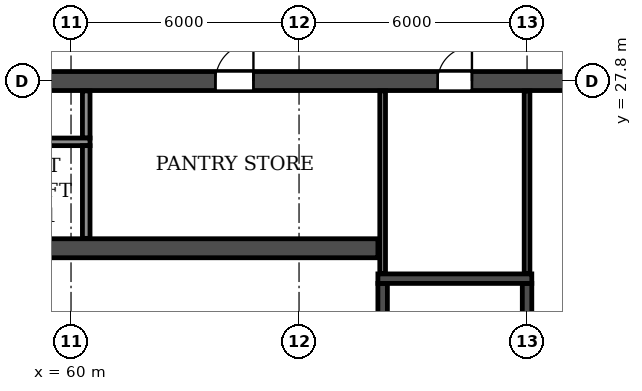
"""IFC4 building model, lengths in metres.
Left out: names, types, materials, properties, quantities, classifications, styles, units other than length and angle.
Written with IfcOpenShell. Run it as: python <this file> out.ifc"""

import sys

from ifc_helpers import new_model, si_unit, direction, frame, frame_2d, origin, place, context, subcontext, project, spatial, rectangle, extrude, element, fill, save


model = new_model("IFC4")
c1 = context("Model", 3, precision=1e-05, world=origin(), true_north=direction((0.0, 1.0)))
c2 = subcontext(c1, "Body", "Model", "MODEL_VIEW")
j1 = project(units=[si_unit("LENGTHUNIT", "METRE"), si_unit("PLANEANGLEUNIT", "RADIAN")], contexts=[c1])
p1 = place(None, origin())
s1 = spatial("IfcSite", under=j1, at=p1, CompositionType="ELEMENT")
p2 = place(p1, origin())
s2 = spatial("IfcBuilding", under=s1, at=p2, CompositionType="ELEMENT")
p3 = place(p2, frame((0.0, 0.0, 72.9)))
s3 = spatial("IfcBuildingStorey", under=s2, at=p3, CompositionType="ELEMENT", Elevation=72.9)
p4 = place(p3, frame((8.6, 27.8, 0.0), z_axis=(0.0, 0.0, 1.0), x_axis=(1.0, 0.0, 0.0)))
e1 = element("IfcWall", 1, at=p4, inside=s3, PredefinedType="SOLIDWALL", context=c2, shape_type="SweptSolid", body=[
    extrude(rectangle(XDim=84.8, YDim=0.5, at=frame_2d((42.4, 0.0))), origin(), (0.0, 0.0, 1.0), 3.06),
])
p5 = place(p4, frame((2.0, 0.0, 0.0)))
e2 = element("IfcOpeningElement", 2, at=p5, cuts=e1, PredefinedType="OPENING", context=c2, shape_type="SweptSolid", body=[
    extrude(rectangle(XDim=1.5, YDim=2.1, at=frame_2d((0.75, 1.05))), frame((0.0, 0.26, 0.0), z_axis=(0.0, -1.0, 0.0), x_axis=(1.0, 0.0, 0.0)), (0.0, 0.0, 1.0), 0.52),
])
p6 = place(p4, frame((6.95, 0.0, 0.0)))
e3 = element("IfcOpeningElement", 3, at=p6, cuts=e1, PredefinedType="OPENING", context=c2, shape_type="SweptSolid", body=[
    extrude(rectangle(XDim=1.0, YDim=2.1, at=frame_2d((0.5, 1.05))), frame((0.0, 0.26, 0.0), z_axis=(0.0, -1.0, 0.0), x_axis=(1.0, 0.0, 0.0)), (0.0, 0.0, 1.0), 0.52),
])
p7 = place(p4, frame((10.3, 0.0, 0.0)))
e4 = element("IfcOpeningElement", 4, at=p7, cuts=e1, PredefinedType="OPENING", context=c2, shape_type="SweptSolid", body=[
    extrude(rectangle(XDim=1.0, YDim=2.1, at=frame_2d((0.5, 1.05))), frame((0.0, 0.26, 0.0), z_axis=(0.0, -1.0, 0.0), x_axis=(1.0, 0.0, 0.0)), (0.0, 0.0, 1.0), 0.52),
])
p8 = place(p4, frame((13.65, 0.0, 0.0)))
e5 = element("IfcOpeningElement", 5, at=p8, cuts=e1, PredefinedType="OPENING", context=c2, shape_type="SweptSolid", body=[
    extrude(rectangle(XDim=0.9, YDim=2.1, at=frame_2d((0.45, 1.05))), frame((0.0, 0.26, 0.0), z_axis=(0.0, -1.0, 0.0), x_axis=(1.0, 0.0, 0.0)), (0.0, 0.0, 1.0), 0.52),
])
p9 = place(p4, frame((22.85, 0.0, 0.0)))
e6 = element("IfcOpeningElement", 6, at=p9, cuts=e1, PredefinedType="OPENING", context=c2, shape_type="SweptSolid", body=[
    extrude(rectangle(XDim=0.9, YDim=2.1, at=frame_2d((0.45, 1.05))), frame((0.0, 0.26, 0.0), z_axis=(0.0, -1.0, 0.0), x_axis=(1.0, 0.0, 0.0)), (0.0, 0.0, 1.0), 0.52),
])
p10 = place(p4, frame((26.0, 0.0, 0.0)))
e7 = element("IfcOpeningElement", 7, at=p10, cuts=e1, PredefinedType="OPENING", context=c2, shape_type="SweptSolid", body=[
    extrude(rectangle(XDim=1.0, YDim=2.1, at=frame_2d((0.5, 1.05))), frame((0.0, 0.26, 0.0), z_axis=(0.0, -1.0, 0.0), x_axis=(1.0, 0.0, 0.0)), (0.0, 0.0, 1.0), 0.52),
])
p11 = place(p4, frame((31.2, 0.0, 0.0)))
e8 = element("IfcOpeningElement", 8, at=p11, cuts=e1, PredefinedType="OPENING", context=c2, shape_type="SweptSolid", body=[
    extrude(rectangle(XDim=1.0, YDim=2.1, at=frame_2d((0.5, 1.05))), frame((0.0, 0.26, 0.0), z_axis=(0.0, -1.0, 0.0), x_axis=(1.0, 0.0, 0.0)), (0.0, 0.0, 1.0), 0.52),
])
p12 = place(p4, frame((39.0, 0.0, 0.0)))
e9 = element("IfcOpeningElement", 9, at=p12, cuts=e1, PredefinedType="OPENING", context=c2, shape_type="SweptSolid", body=[
    extrude(rectangle(XDim=1.0, YDim=2.1, at=frame_2d((0.5, 1.05))), frame((0.0, 0.26, 0.0), z_axis=(0.0, -1.0, 0.0), x_axis=(1.0, 0.0, 0.0)), (0.0, 0.0, 1.0), 0.52),
])
p13 = place(p4, frame((41.9, 0.0, 0.0)))
e10 = element("IfcOpeningElement", 10, at=p13, cuts=e1, PredefinedType="OPENING", context=c2, shape_type="SweptSolid", body=[
    extrude(rectangle(XDim=1.0, YDim=2.1, at=frame_2d((0.5, 1.05))), frame((0.0, 0.26, 0.0), z_axis=(0.0, -1.0, 0.0), x_axis=(1.0, 0.0, 0.0)), (0.0, 0.0, 1.0), 0.52),
])
p14 = place(p4, frame((44.8, 0.0, 0.0)))
e11 = element("IfcOpeningElement", 11, at=p14, cuts=e1, PredefinedType="OPENING", context=c2, shape_type="SweptSolid", body=[
    extrude(rectangle(XDim=1.0, YDim=2.1, at=frame_2d((0.5, 1.05))), frame((0.0, 0.26, 0.0), z_axis=(0.0, -1.0, 0.0), x_axis=(1.0, 0.0, 0.0)), (0.0, 0.0, 1.0), 0.52),
])
p15 = place(p4, frame((48.7, 0.0, 0.0)))
e12 = element("IfcOpeningElement", 12, at=p15, cuts=e1, PredefinedType="OPENING", context=c2, shape_type="SweptSolid", body=[
    extrude(rectangle(XDim=1.0, YDim=2.1, at=frame_2d((0.5, 1.05))), frame((0.0, 0.26, 0.0), z_axis=(0.0, -1.0, 0.0), x_axis=(1.0, 0.0, 0.0)), (0.0, 0.0, 1.0), 0.52),
])
p16 = place(p4, frame((55.2, 0.0, 0.0)))
e13 = element("IfcOpeningElement", 13, at=p16, cuts=e1, PredefinedType="OPENING", context=c2, shape_type="SweptSolid", body=[
    extrude(rectangle(XDim=1.0, YDim=2.1, at=frame_2d((0.5, 1.05))), frame((0.0, 0.26, 0.0), z_axis=(0.0, -1.0, 0.0), x_axis=(1.0, 0.0, 0.0)), (0.0, 0.0, 1.0), 0.52),
])
p17 = place(p4, frame((61.05, 0.0, 0.0)))
e14 = element("IfcOpeningElement", 14, at=p17, cuts=e1, PredefinedType="OPENING", context=c2, shape_type="SweptSolid", body=[
    extrude(rectangle(XDim=0.9, YDim=2.1, at=frame_2d((0.45, 1.05))), frame((0.0, 0.26, 0.0), z_axis=(0.0, -1.0, 0.0), x_axis=(1.0, 0.0, 0.0)), (0.0, 0.0, 1.0), 0.52),
])
p18 = place(p4, frame((70.25, 0.0, 0.0)))
e15 = element("IfcOpeningElement", 15, at=p18, cuts=e1, PredefinedType="OPENING", context=c2, shape_type="SweptSolid", body=[
    extrude(rectangle(XDim=0.9, YDim=2.1, at=frame_2d((0.45, 1.05))), frame((0.0, 0.26, 0.0), z_axis=(0.0, -1.0, 0.0), x_axis=(1.0, 0.0, 0.0)), (0.0, 0.0, 1.0), 0.52),
])
p19 = place(p4, frame((73.5, 0.0, 0.0)))
e16 = element("IfcOpeningElement", 16, at=p19, cuts=e1, PredefinedType="OPENING", context=c2, shape_type="SweptSolid", body=[
    extrude(rectangle(XDim=1.0, YDim=2.1, at=frame_2d((0.5, 1.05))), frame((0.0, 0.26, 0.0), z_axis=(0.0, -1.0, 0.0), x_axis=(1.0, 0.0, 0.0)), (0.0, 0.0, 1.0), 0.52),
])
p20 = place(p4, frame((76.25, 0.0, 0.0)))
e17 = element("IfcOpeningElement", 17, at=p20, cuts=e1, PredefinedType="OPENING", context=c2, shape_type="SweptSolid", body=[
    extrude(rectangle(XDim=1.0, YDim=2.1, at=frame_2d((0.5, 1.05))), frame((0.0, 0.26, 0.0), z_axis=(0.0, -1.0, 0.0), x_axis=(1.0, 0.0, 0.0)), (0.0, 0.0, 1.0), 0.52),
])
p21 = place(p4, frame((80.95, 0.0, 0.0)))
e18 = element("IfcOpeningElement", 18, at=p21, cuts=e1, PredefinedType="OPENING", context=c2, shape_type="SweptSolid", body=[
    extrude(rectangle(XDim=1.0, YDim=2.1, at=frame_2d((0.5, 1.05))), frame((0.0, 0.26, 0.0), z_axis=(0.0, -1.0, 0.0), x_axis=(1.0, 0.0, 0.0)), (0.0, 0.0, 1.0), 0.52),
])
p22 = place(p3, frame((33.925, 23.4, 0.0), z_axis=(0.0, 0.0, 1.0), x_axis=(1.0, 0.0, 0.0)))
e19 = element("IfcWall", 19, at=p22, inside=s3, PredefinedType="SOLIDWALL", context=c2, shape_type="SweptSolid", body=[
    extrude(rectangle(XDim=34.15, YDim=0.5, at=frame_2d((17.075, 0.0))), origin(), (0.0, 0.0, 1.0), 3.06),
])
p23 = place(p22, frame((16.175, 0.0, 0.0)))
e20 = element("IfcOpeningElement", 20, at=p23, cuts=e19, PredefinedType="OPENING", context=c2, shape_type="SweptSolid", body=[
    extrude(rectangle(XDim=1.8, YDim=2.1, at=frame_2d((0.9, 1.05))), frame((0.0, 0.26, 0.0), z_axis=(0.0, -1.0, 0.0), x_axis=(1.0, 0.0, 0.0)), (0.0, 0.0, 1.0), 0.52),
])
p24 = place(p22, frame((11.025, 0.0, 0.0)))
e21 = element("IfcOpeningElement", 21, at=p24, cuts=e19, PredefinedType="OPENING", context=c2, shape_type="SweptSolid", body=[
    extrude(rectangle(XDim=1.1, YDim=2.1, at=frame_2d((0.55, 1.05))), frame((0.0, 0.26, 0.0), z_axis=(0.0, -1.0, 0.0), x_axis=(1.0, 0.0, 0.0)), (0.0, 0.0, 1.0), 0.52),
])
p25 = place(p3, frame((68.2, 14.85, 0.0), z_axis=(0.0, 0.0, 1.0), x_axis=(0.0, 1.0, 0.0)))
e22 = element("IfcWall", 22, at=p25, inside=s3, PredefinedType="SOLIDWALL", context=c2, shape_type="SweptSolid", body=[
    extrude(rectangle(XDim=7.625, YDim=0.25, at=frame_2d((3.812, 0.0))), origin(), (0.0, 0.0, 1.0), 3.06),
])
p26 = place(p25, frame((0.45, 0.0, 0.0)))
e23 = element("IfcOpeningElement", 23, at=p26, cuts=e22, PredefinedType="OPENING", context=c2, shape_type="SweptSolid", body=[
    extrude(rectangle(XDim=1.0, YDim=2.1, at=frame_2d((0.5, 1.05))), frame((0.0, 0.135, 0.0), z_axis=(0.0, -1.0, 0.0), x_axis=(1.0, 0.0, 0.0)), (0.0, 0.0, 1.0), 0.27),
])
p27 = place(p3, frame((72.0, 14.85, 0.0), z_axis=(0.0, 0.0, 1.0), x_axis=(0.0, 1.0, 0.0)))
e24 = element("IfcWall", 24, at=p27, inside=s3, PredefinedType="SOLIDWALL", context=c2, shape_type="SweptSolid", body=[
    extrude(rectangle(XDim=7.625, YDim=0.25, at=frame_2d((3.812, 0.0))), origin(), (0.0, 0.0, 1.0), 3.06),
])
p28 = place(p3, frame((68.075, 22.6, 0.0), z_axis=(0.0, 0.0, 1.0), x_axis=(1.0, 0.0, 0.0)))
e25 = element("IfcWall", 25, at=p28, inside=s3, PredefinedType="SOLIDWALL", context=c2, shape_type="SweptSolid", body=[
    extrude(rectangle(XDim=4.05, YDim=0.25, at=frame_2d((2.025, 0.0))), origin(), (0.0, 0.0, 1.0), 3.06),
])
p29 = place(p3, frame((60.4, 26.3, 0.0), z_axis=(0.0, 0.0, 1.0), x_axis=(0.0, 1.0, 0.0)))
e26 = element("IfcWall", 26, at=p29, inside=s3, PredefinedType="PARTITIONING", context=c2, shape_type="SweptSolid", body=[
    extrude(rectangle(XDim=1.24, YDim=0.2, at=frame_2d((0.62, 0.0))), origin(), (0.0, 0.0, 1.0), 3.06),
])
for number, where, z_axis, x_axis in (
    (27, (68.2, 22.735, 0.0), (0.0, 0.0, 1.0), (0.0, 1.0, 0.0)),
    (28, (72.0, 22.735, 0.0), (0.0, 0.0, 1.0), (0.0, 1.0, 0.0)),
):
    element("IfcWall", number, at=place(p3, frame(where, z_axis=z_axis, x_axis=x_axis)), inside=s3, PredefinedType="PARTITIONING", context=c2, shape_type="SweptSolid", body=[
        extrude(rectangle(XDim=4.805, YDim=0.15, at=frame_2d((2.402, 0.0))), origin(), (0.0, 0.0, 1.0), 3.06),
    ])
p30 = place(p3, frame((52.5, 26.2, 0.0), z_axis=(0.0, 0.0, 1.0), x_axis=(1.0, 0.0, 0.0)))
e29 = element("IfcWall", 29, at=p30, inside=s3, PredefinedType="PARTITIONING", context=c2, shape_type="SweptSolid", body=[
    extrude(rectangle(XDim=8.0, YDim=0.2, at=frame_2d((4.0, 0.0))), origin(), (0.0, 0.0, 1.0), 3.06),
])
p31 = place(p3, frame((60.4, 23.66, 0.0), z_axis=(0.0, 0.0, 1.0), x_axis=(0.0, 1.0, 0.0)))
e30 = element("IfcWall", 30, at=p31, inside=s3, PredefinedType="PARTITIONING", context=c2, shape_type="SweptSolid", body=[
    extrude(rectangle(XDim=2.44, YDim=0.2, at=frame_2d((1.22, 0.0))), origin(), (0.0, 0.0, 1.0), 3.06),
])
p32 = place(p16, origin())
e31 = element("IfcDoor", 31, at=p32, inside=s3, OperationType="SINGLE_SWING_RIGHT", PredefinedType="DOOR", context=c2, shape_type="SweptSolid", body=[
    extrude(rectangle(XDim=1.0, YDim=2.1, at=frame_2d((0.5, 1.05))), frame((0.0, 0.025, 0.0), z_axis=(0.0, -1.0, 0.0), x_axis=(1.0, 0.0, 0.0)), (0.0, 0.0, 1.0), 0.05),
])
fill(e13, e31)
p33 = place(p17, origin())
e32 = element("IfcDoor", 32, at=p33, inside=s3, OperationType="SINGLE_SWING_RIGHT", PredefinedType="DOOR", context=c2, shape_type="SweptSolid", body=[
    extrude(rectangle(XDim=0.9, YDim=2.1, at=frame_2d((0.45, 1.05))), frame((0.0, 0.025, 0.0), z_axis=(0.0, -1.0, 0.0), x_axis=(1.0, 0.0, 0.0)), (0.0, 0.0, 1.0), 0.05),
])
fill(e14, e32)
save(model, sys.argv[1])
